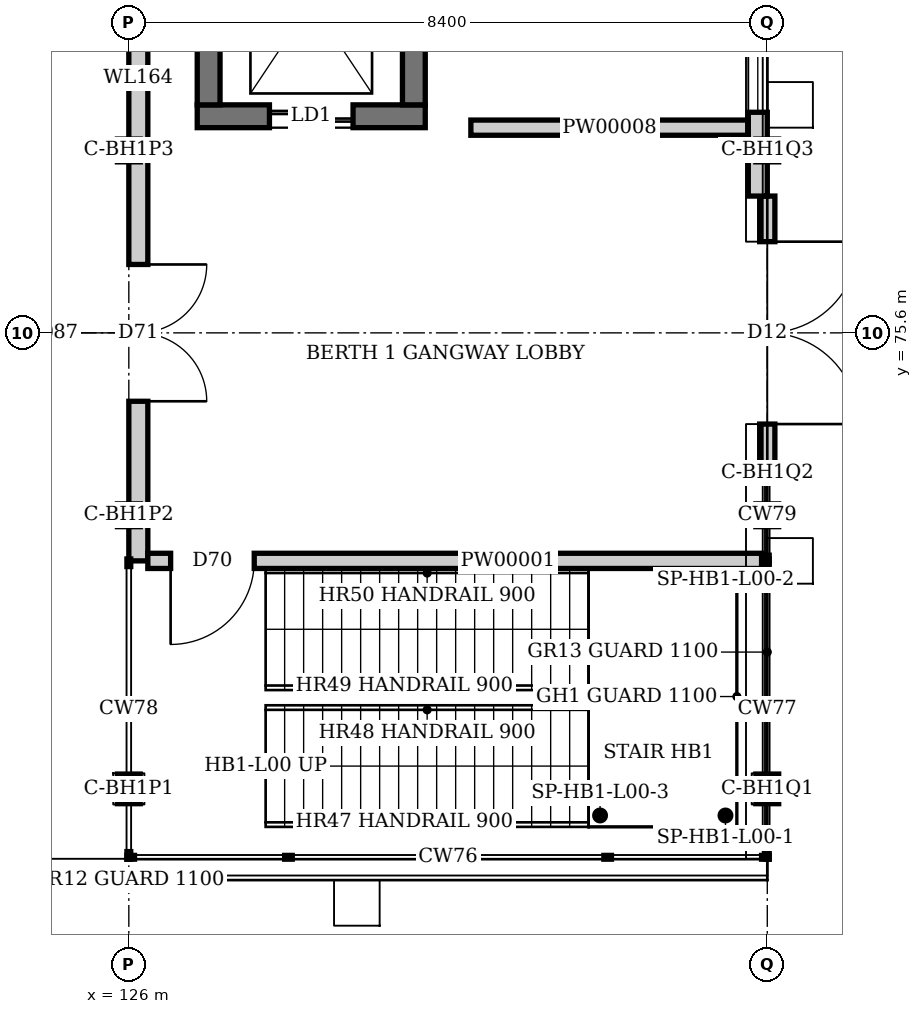
"""IFC4 building model, lengths in metres.
Left out: names, types, materials, properties, quantities, classifications, styles, units other than length and angle.
Written with IfcOpenShell. Run it as: python <this file> out.ifc"""

import sys

from ifc_helpers import new_model, si_unit, direction, frame, frame_2d, origin, origin_2d, place, context, subcontext, project, spatial, rectangle, hollow_circle, i_section, extrude, element, fill, save


model = new_model("IFC4")
c1 = context("Model", 3, precision=1e-05, world=origin(), true_north=direction((0.0, 1.0)))
c2 = subcontext(c1, "Body", "Model", "MODEL_VIEW")
j1 = project(units=[si_unit("LENGTHUNIT", "METRE"), si_unit("PLANEANGLEUNIT", "RADIAN")], contexts=[c1])
p1 = place(None, origin())
s1 = spatial("IfcSite", under=j1, at=p1, CompositionType="ELEMENT")
p2 = place(p1, origin())
s2 = spatial("IfcBuilding", under=s1, at=p2, CompositionType="ELEMENT")
p3 = place(p2, origin())
s3 = spatial("IfcBuildingStorey", under=s2, at=p3, CompositionType="ELEMENT", Elevation=0.0)
p4 = place(p3, frame((126.9, 78.45, -0.3), z_axis=(0.0, 0.0, 1.0), x_axis=(1.0, 0.0, 0.0)))
e1 = element("IfcWall", 1, at=p4, inside=s3, PredefinedType="SHEAR", context=c2, shape_type="SweptSolid", body=[
    extrude(rectangle(XDim=3.0, YDim=0.3, at=frame_2d((1.5, 0.0))), origin(), (0.0, 0.0, 1.0), 6.3),
])
p5 = place(p4, frame((0.95, 0.0, 0.3)))
e2 = element("IfcOpeningElement", 2, at=p5, cuts=e1, PredefinedType="OPENING", context=c2, shape_type="SweptSolid", body=[
    extrude(rectangle(XDim=1.1, YDim=2.1, at=frame_2d((0.55, 1.05))), frame((0.0, 0.16, 0.0), z_axis=(0.0, -1.0, 0.0), x_axis=(1.0, 0.0, 0.0)), (0.0, 0.0, 1.0), 0.32),
])
for number, where, z_axis, x_axis in (
    (3, (129.75, 78.6, -0.3), (0.0, 0.0, 1.0), (0.0, 1.0, 0.0)),
    (4, (127.05, 78.6, -0.3), (0.0, 0.0, 1.0), (0.0, 1.0, 0.0)),
):
    element("IfcWall", number, at=place(p3, frame(where, z_axis=z_axis, x_axis=x_axis)), inside=s3, PredefinedType="SHEAR", context=c2, shape_type="SweptSolid", body=[
        extrude(rectangle(XDim=2.7, YDim=0.3, at=frame_2d((1.35, 0.0))), origin(), (0.0, 0.0, 1.0), 6.3),
    ])
p6 = place(p3, frame((126.0, 69.6, -0.6), z_axis=(0.0, 0.0, 1.0), x_axis=(1.0, 0.0, 0.0)))
e5 = element("IfcColumn", 5, at=p6, inside=s3, PredefinedType="COLUMN", context=c2, shape_type="SweptSolid", body=[
    extrude(i_section(OverallWidth=0.3, OverallDepth=0.39, WebThickness=0.011, FlangeThickness=0.019, at=origin_2d()), origin(), (0.0, 0.0, 1.0), 6.6),
])
for number, where, z_axis, x_axis in (
    (6, (126.0, 73.2, -0.6), (0.0, 0.0, 1.0), (1.0, 0.0, 0.0)),
    (7, (126.0, 78.0, -0.6), (0.0, 0.0, 1.0), (1.0, 0.0, 0.0)),
):
    element("IfcColumn", number, at=place(p3, frame(where, z_axis=z_axis, x_axis=x_axis)), inside=s3, PredefinedType="COLUMN", context=c2, shape_type="SweptSolid", body=[
        extrude(i_section(OverallWidth=0.3, OverallDepth=0.3, WebThickness=0.011, FlangeThickness=0.019, at=origin_2d()), origin(), (0.0, 0.0, 1.0), 6.6),
    ])
p7 = place(p3, frame((134.4, 69.6, -0.6), z_axis=(0.0, 0.0, 1.0), x_axis=(1.0, 0.0, 0.0)))
e8 = element("IfcColumn", 8, at=p7, inside=s3, PredefinedType="COLUMN", context=c2, shape_type="SweptSolid", body=[
    extrude(i_section(OverallWidth=0.3, OverallDepth=0.39, WebThickness=0.011, FlangeThickness=0.019, at=origin_2d()), origin(), (0.0, 0.0, 1.0), 6.6),
])
for number, where, z_axis, x_axis in (
    (9, (134.4, 73.2, -0.6), (0.0, 0.0, 1.0), (1.0, 0.0, 0.0)),
    (10, (134.4, 78.0, -0.6), (0.0, 0.0, 1.0), (1.0, 0.0, 0.0)),
):
    element("IfcColumn", number, at=place(p3, frame(where, z_axis=z_axis, x_axis=x_axis)), inside=s3, PredefinedType="COLUMN", context=c2, shape_type="SweptSolid", body=[
        extrude(i_section(OverallWidth=0.3, OverallDepth=0.3, WebThickness=0.011, FlangeThickness=0.019, at=origin_2d()), origin(), (0.0, 0.0, 1.0), 6.6),
    ])
p8 = place(p3, frame((134.4, 73.755, 0.0), z_axis=(0.0, 0.0, 1.0), x_axis=(0.0, 1.0, 0.0)))
e11 = element("IfcWall", 11, at=p8, inside=s3, PredefinedType="SOLIDWALL", context=c2, shape_type="SweptSolid", body=[
    extrude(rectangle(XDim=3.645, YDim=0.2, at=frame_2d((1.823, 0.0))), origin(), (0.0, 0.0, 1.0), 5.346),
])
p9 = place(p8, frame((0.645, 0.0, 0.0)))
e12 = element("IfcOpeningElement", 12, at=p9, cuts=e11, PredefinedType="OPENING", context=c2, shape_type="SweptSolid", body=[
    extrude(rectangle(XDim=2.4, YDim=2.4, at=frame_2d((1.2, 1.2))), frame((0.0, 0.11, 0.0), z_axis=(0.0, -1.0, 0.0), x_axis=(1.0, 0.0, 0.0)), (0.0, 0.0, 1.0), 0.22),
])
p10 = place(p3, frame((134.275, 77.4, 0.0), z_axis=(0.0, 0.0, 1.0), x_axis=(0.0, 1.0, 0.0)))
e13 = element("IfcWall", 13, at=p10, inside=s3, PredefinedType="SOLIDWALL", context=c2, shape_type="SweptSolid", body=[
    extrude(rectangle(XDim=4.005, YDim=0.25, at=frame_2d((2.002, 0.0))), origin(), (0.0, 0.0, 1.0), 5.8),
])
p11 = place(p10, frame((1.103, 0.0, 0.9)))
e14 = element("IfcOpeningElement", 14, at=p11, cuts=e13, PredefinedType="OPENING", context=c2, shape_type="SweptSolid", body=[
    extrude(rectangle(XDim=1.8, YDim=1.8, at=frame_2d((0.9, 0.9))), frame((0.0, 0.135, 0.0), z_axis=(0.0, -1.0, 0.0), x_axis=(1.0, 0.0, 0.0)), (0.0, 0.0, 1.0), 0.27),
])
p12 = place(p3, frame((126.125, 72.6, 0.0), z_axis=(0.0, 0.0, 1.0), x_axis=(0.0, 1.0, 0.0)))
e15 = element("IfcWall", 15, at=p12, inside=s3, PredefinedType="SOLIDWALL", context=c2, shape_type="SweptSolid", body=[
    extrude(rectangle(XDim=8.805, YDim=0.25, at=frame_2d((4.402, 0.0))), origin(), (0.0, 0.0, 1.0), 5.8),
])
p13 = place(p12, frame((2.1, 0.0, 0.0)))
e16 = element("IfcOpeningElement", 16, at=p13, cuts=e15, PredefinedType="OPENING", context=c2, shape_type="SweptSolid", body=[
    extrude(rectangle(XDim=1.8, YDim=2.0, at=frame_2d((0.9, 1.0))), frame((0.0, 0.135, 0.0), z_axis=(0.0, -1.0, 0.0), x_axis=(1.0, 0.0, 0.0)), (0.0, 0.0, 1.0), 0.27),
])
p14 = place(p3, frame((126.25, 72.6, 0.0), z_axis=(0.0, 0.0, 1.0), x_axis=(1.0, 0.0, 0.0)))
e17 = element("IfcWall", 17, at=p14, inside=s3, PredefinedType="PARTITIONING", context=c2, shape_type="SweptSolid", body=[
    extrude(rectangle(XDim=8.075, YDim=0.2, at=frame_2d((4.038, 0.0))), origin(), (0.0, 0.0, 1.0), 5.8),
])
p15 = place(p14, frame((0.3, 0.0, 0.0)))
e18 = element("IfcOpeningElement", 18, at=p15, cuts=e17, PredefinedType="OPENING", context=c2, shape_type="SweptSolid", body=[
    extrude(rectangle(XDim=1.1, YDim=2.4, at=frame_2d((0.55, 1.2))), frame((0.0, 0.11, 0.0), z_axis=(0.0, -1.0, 0.0), x_axis=(1.0, 0.0, 0.0)), (0.0, 0.0, 1.0), 0.22),
])
p16 = place(p3, frame((130.5, 78.3, 0.0), z_axis=(0.0, 0.0, 1.0), x_axis=(1.0, 0.0, 0.0)))
e19 = element("IfcWall", 19, at=p16, inside=s3, PredefinedType="PARTITIONING", context=c2, shape_type="SweptSolid", body=[
    extrude(rectangle(XDim=3.65, YDim=0.2, at=frame_2d((1.825, 0.0))), origin(), (0.0, 0.0, 1.0), 5.8),
])
for number, where, z_axis, x_axis in (
    (20, (133.85, 69.25, 0.0), (0.0, 0.0, 1.0), (1.0, 0.0, 0.0)),
    (21, (133.85, 72.35, 0.0), (0.0, 0.0, 1.0), (1.0, 0.0, 0.0)),
    (22, (132.2, 69.25, 0.0), (0.0, 0.0, 1.0), (1.0, 0.0, 0.0)),
):
    element("IfcColumn", number, at=place(p3, frame(where, z_axis=z_axis, x_axis=x_axis)), inside=s3, PredefinedType="COLUMN", context=c2, shape_type="SweptSolid", body=[
        extrude(hollow_circle(Radius=0.07, WallThickness=0.008, at=origin_2d()), origin(), (0.0, 0.0, 1.0), 2.8),
    ])
p17 = place(p9, frame((2.4, 0.0, 0.0), z_axis=(0.0, 0.0, 1.0), x_axis=(-1.0, 0.0, 0.0)))
e23 = element("IfcDoor", 23, at=p17, inside=s3, OperationType="DOUBLE_DOOR_SINGLE_SWING", PredefinedType="DOOR", context=c2, shape_type="SweptSolid", body=[
    extrude(rectangle(XDim=2.4, YDim=2.4, at=frame_2d((1.2, 1.2))), frame((0.0, 0.025, 0.0), z_axis=(0.0, -1.0, 0.0), x_axis=(1.0, 0.0, 0.0)), (0.0, 0.0, 1.0), 0.05),
])
fill(e12, e23)
p18 = place(p11, origin())
e24 = element("IfcWindow", 24, at=p18, inside=s3, PartitioningType="SINGLE_PANEL", PredefinedType="WINDOW", context=c2, shape_type="SweptSolid", body=[
    extrude(rectangle(XDim=1.8, YDim=1.8, at=frame_2d((0.9, 0.9))), frame((0.0, 0.03, 0.0), z_axis=(0.0, -1.0, 0.0), x_axis=(1.0, 0.0, 0.0)), (0.0, 0.0, 1.0), 0.06),
])
fill(e14, e24)
p19 = place(p15, frame((1.1, 0.0, 0.0), z_axis=(0.0, 0.0, 1.0), x_axis=(-1.0, 0.0, 0.0)))
e25 = element("IfcDoor", 25, at=p19, inside=s3, OperationType="SINGLE_SWING_RIGHT", PredefinedType="DOOR", context=c2, shape_type="SweptSolid", body=[
    extrude(rectangle(XDim=1.1, YDim=2.4, at=frame_2d((0.55, 1.2))), frame((0.0, 0.025, 0.0), z_axis=(0.0, -1.0, 0.0), x_axis=(1.0, 0.0, 0.0)), (0.0, 0.0, 1.0), 0.05),
])
fill(e18, e25)
p20 = place(p13, frame((1.8, 0.0, 0.0), z_axis=(0.0, 0.0, 1.0), x_axis=(-1.0, 0.0, 0.0)))
e26 = element("IfcDoor", 26, at=p20, inside=s3, OperationType="DOUBLE_DOOR_SINGLE_SWING", PredefinedType="DOOR", context=c2, shape_type="SweptSolid", body=[
    extrude(rectangle(XDim=1.8, YDim=2.0, at=frame_2d((0.9, 1.0))), frame((0.0, 0.025, 0.0), z_axis=(0.0, -1.0, 0.0), x_axis=(1.0, 0.0, 0.0)), (0.0, 0.0, 1.0), 0.05),
])
fill(e16, e26)
p21 = place(p5, origin())
e27 = element("IfcDoor", 27, at=p21, inside=s3, OperationType="SLIDING_TO_LEFT", PredefinedType="DOOR", context=c2, shape_type="SweptSolid", body=[
    extrude(rectangle(XDim=1.1, YDim=2.1, at=frame_2d((0.55, 1.05))), frame((0.0, 0.025, 0.0), z_axis=(0.0, -1.0, 0.0), x_axis=(1.0, 0.0, 0.0)), (0.0, 0.0, 1.0), 0.05),
])
fill(e2, e27)
save(model, sys.argv[1])
